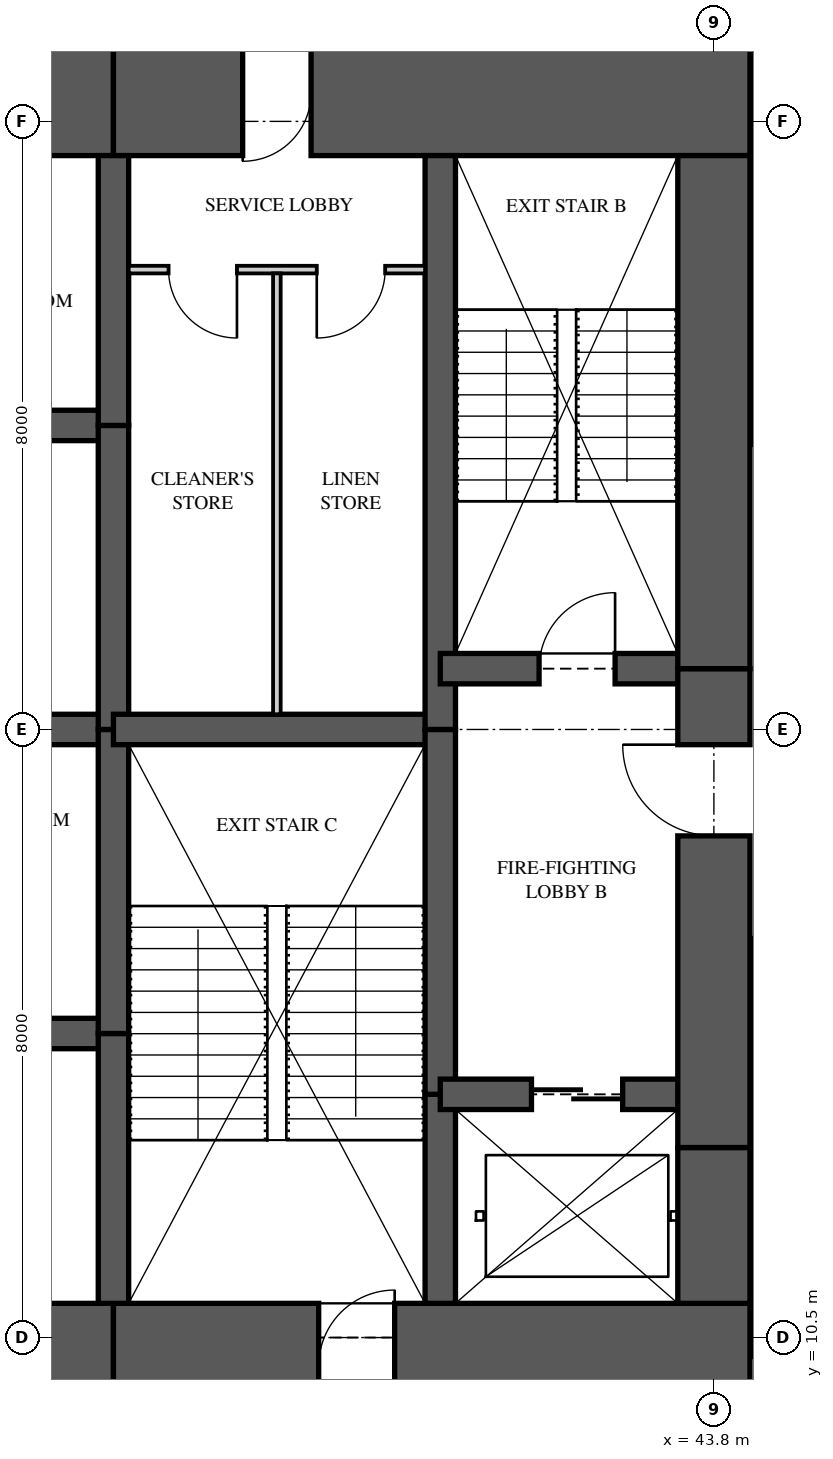
"""IFC4 building model, lengths in metres.
Left out: names, types, materials, properties, quantities, classifications, styles, units other than length and angle.
Written with IfcOpenShell. Run it as: python <this file> out.ifc"""

import sys

from ifc_helpers import new_model, si_unit, direction, frame, frame_2d, origin, place, context, subcontext, project, spatial, rectangle, extrude, element, fill, save


model = new_model("IFC4")
c1 = context("Model", 3, precision=1e-05, world=origin(), true_north=direction((0.0, 1.0)))
c2 = subcontext(c1, "Body", "Model", "MODEL_VIEW")
j1 = project(units=[si_unit("LENGTHUNIT", "METRE"), si_unit("PLANEANGLEUNIT", "RADIAN")], contexts=[c1])
p1 = place(None, origin())
s1 = spatial("IfcSite", under=j1, at=p1, CompositionType="ELEMENT")
p2 = place(p1, origin())
s2 = spatial("IfcBuilding", under=s1, at=p2, CompositionType="ELEMENT")
p3 = place(p2, frame((0.0, 0.0, 51.15)))
s3 = spatial("IfcBuildingStorey", under=s2, at=p3, CompositionType="ELEMENT", Elevation=51.15)
p4 = place(p3, frame((31.6, 10.125, 0.0), z_axis=(0.0, 0.0, 1.0), x_axis=(1.0, 0.0, 0.0)))
e1 = element("IfcWall", 1, at=p4, inside=s3, PredefinedType="SHEAR", context=c2, shape_type="SweptSolid", body=[
    extrude(rectangle(XDim=4.3, YDim=1.65, at=frame_2d((2.15, 0.0))), origin(), (0.0, 0.0, 1.0), 3.35),
])
p5 = place(p3, frame((35.9, 10.125, 0.0), z_axis=(0.0, 0.0, 1.0), x_axis=(1.0, 0.0, 0.0)))
e2 = element("IfcWall", 2, at=p5, inside=s3, PredefinedType="SHEAR", context=c2, shape_type="SweptSolid", body=[
    extrude(rectangle(XDim=8.375, YDim=1.65, at=frame_2d((4.188, 0.0))), origin(), (0.0, 0.0, 1.0), 3.35),
])
p6 = place(p5, frame((2.7, 0.0, 0.0)))
e3 = element("IfcOpeningElement", 3, at=p6, cuts=e2, PredefinedType="OPENING", context=c2, shape_type="SweptSolid", body=[
    extrude(rectangle(XDim=1.0, YDim=2.1, at=frame_2d((0.5, 1.05))), frame((0.0, 0.835, 0.0), z_axis=(0.0, -1.0, 0.0), x_axis=(1.0, 0.0, 0.0)), (0.0, 0.0, 1.0), 1.67),
])
p7 = place(p3, frame((44.275, 26.875, 0.0), z_axis=(0.0, 0.0, 1.0), x_axis=(-1.0, 0.0, 0.0)))
e4 = element("IfcWall", 4, at=p7, inside=s3, PredefinedType="SHEAR", context=c2, shape_type="SweptSolid", body=[
    extrude(rectangle(XDim=8.375, YDim=1.65, at=frame_2d((4.188, 0.0))), origin(), (0.0, 0.0, 1.0), 3.35),
])
p8 = place(p7, frame((5.775, 0.0, 0.0)))
e5 = element("IfcOpeningElement", 5, at=p8, cuts=e4, PredefinedType="OPENING", context=c2, shape_type="SweptSolid", body=[
    extrude(rectangle(XDim=0.9, YDim=2.1, at=frame_2d((0.45, 1.05))), frame((0.0, 0.835, 0.0), z_axis=(0.0, -1.0, 0.0), x_axis=(1.0, 0.0, 0.0)), (0.0, 0.0, 1.0), 1.67),
])
p9 = place(p3, frame((35.9, 26.875, 0.0), z_axis=(0.0, 0.0, 1.0), x_axis=(-1.0, 0.0, 0.0)))
e6 = element("IfcWall", 6, at=p9, inside=s3, PredefinedType="SHEAR", context=c2, shape_type="SweptSolid", body=[
    extrude(rectangle(XDim=4.3, YDim=1.65, at=frame_2d((2.15, 0.0))), origin(), (0.0, 0.0, 1.0), 3.35),
])
p10 = place(p3, frame((43.8, 10.95, 0.0), z_axis=(0.0, 0.0, 1.0), x_axis=(0.0, 1.0, 0.0)))
e7 = element("IfcWall", 7, at=p10, inside=s3, PredefinedType="SHEAR", context=c2, shape_type="SweptSolid", body=[
    extrude(rectangle(XDim=2.05, YDim=0.95, at=frame_2d((1.025, 0.0))), origin(), (0.0, 0.0, 1.0), 3.35),
])
p11 = place(p3, frame((43.8, 13.0, 0.0), z_axis=(0.0, 0.0, 1.0), x_axis=(0.0, 1.0, 0.0)))
e8 = element("IfcWall", 8, at=p11, inside=s3, PredefinedType="SHEAR", context=c2, shape_type="SweptSolid", body=[
    extrude(rectangle(XDim=6.3, YDim=0.95, at=frame_2d((3.15, 0.0))), origin(), (0.0, 0.0, 1.0), 3.35),
])
p12 = place(p11, frame((4.1, 0.0, 0.0)))
e9 = element("IfcOpeningElement", 9, at=p12, cuts=e8, PredefinedType="OPENING", context=c2, shape_type="SweptSolid", body=[
    extrude(rectangle(XDim=1.2, YDim=2.2, at=frame_2d((0.6, 1.1))), frame((0.0, 0.485, 0.0), z_axis=(0.0, -1.0, 0.0), x_axis=(1.0, 0.0, 0.0)), (0.0, 0.0, 1.0), 0.97),
])
p13 = place(p3, frame((43.8, 19.3, 0.0), z_axis=(0.0, 0.0, 1.0), x_axis=(0.0, 1.0, 0.0)))
e10 = element("IfcWall", 10, at=p13, inside=s3, PredefinedType="SHEAR", context=c2, shape_type="SweptSolid", body=[
    extrude(rectangle(XDim=6.75, YDim=0.95, at=frame_2d((3.375, 0.0))), origin(), (0.0, 0.0, 1.0), 3.35),
])
p14 = place(p3, frame((35.9, 10.95, 0.0), z_axis=(0.0, 0.0, 1.0), x_axis=(0.0, 1.0, 0.0)))
e11 = element("IfcWall", 11, at=p14, inside=s3, PredefinedType="SHEAR", context=c2, shape_type="SweptSolid", body=[
    extrude(rectangle(XDim=3.55, YDim=0.4, at=frame_2d((1.775, 0.0))), origin(), (0.0, 0.0, 1.0), 3.35),
])
for number, where, z_axis, x_axis in (
    (12, (35.9, 14.5, 0.0), (0.0, 0.0, 1.0), (0.0, 1.0, 0.0)),
    (13, (35.9, 18.5, 0.0), (0.0, 0.0, 1.0), (0.0, 1.0, 0.0)),
):
    element("IfcWall", number, at=place(p3, frame(where, z_axis=z_axis, x_axis=x_axis)), inside=s3, PredefinedType="SHEAR", context=c2, shape_type="SweptSolid", body=[
        extrude(rectangle(XDim=4.0, YDim=0.4, at=frame_2d((2.0, 0.0))), origin(), (0.0, 0.0, 1.0), 3.35),
    ])
p15 = place(p3, frame((35.9, 22.5, 0.0), z_axis=(0.0, 0.0, 1.0), x_axis=(0.0, 1.0, 0.0)))
e14 = element("IfcWall", 14, at=p15, inside=s3, PredefinedType="SHEAR", context=c2, shape_type="SweptSolid", body=[
    extrude(rectangle(XDim=3.55, YDim=0.4, at=frame_2d((1.775, 0.0))), origin(), (0.0, 0.0, 1.0), 3.35),
])
p16 = place(p3, frame((40.2, 10.95, 0.0), z_axis=(0.0, 0.0, 1.0), x_axis=(0.0, 1.0, 0.0)))
e15 = element("IfcWall", 15, at=p16, inside=s3, PredefinedType="SHEAR", context=c2, shape_type="SweptSolid", body=[
    extrude(rectangle(XDim=2.75, YDim=0.4, at=frame_2d((1.375, 0.0))), origin(), (0.0, 0.0, 1.0), 3.35),
])
p17 = place(p3, frame((40.2, 13.7, 0.0), z_axis=(0.0, 0.0, 1.0), x_axis=(0.0, 1.0, 0.0)))
e16 = element("IfcWall", 16, at=p17, inside=s3, PredefinedType="SHEAR", context=c2, shape_type="SweptSolid", body=[
    extrude(rectangle(XDim=4.8, YDim=0.4, at=frame_2d((2.4, 0.0))), origin(), (0.0, 0.0, 1.0), 3.35),
])
p18 = place(p3, frame((40.2, 18.5, 0.0), z_axis=(0.0, 0.0, 1.0), x_axis=(0.0, 1.0, 0.0)))
e17 = element("IfcWall", 17, at=p18, inside=s3, PredefinedType="SHEAR", context=c2, shape_type="SweptSolid", body=[
    extrude(rectangle(XDim=7.55, YDim=0.4, at=frame_2d((3.775, 0.0))), origin(), (0.0, 0.0, 1.0), 3.35),
])
for number, where, z_axis, x_axis in (
    (18, (31.6, 14.5, 0.0), (0.0, 0.0, 1.0), (1.0, 0.0, 0.0)),
    (19, (31.6, 18.5, 0.0), (0.0, 0.0, 1.0), (1.0, 0.0, 0.0)),
    (20, (31.6, 22.5, 0.0), (0.0, 0.0, 1.0), (1.0, 0.0, 0.0)),
):
    element("IfcWall", number, at=place(p3, frame(where, z_axis=z_axis, x_axis=x_axis)), inside=s3, PredefinedType="SHEAR", context=c2, shape_type="SweptSolid", body=[
        extrude(rectangle(XDim=4.3, YDim=0.4, at=frame_2d((2.15, 0.0))), origin(), (0.0, 0.0, 1.0), 3.35),
    ])
p19 = place(p3, frame((35.9, 18.5, 0.0), z_axis=(0.0, 0.0, 1.0), x_axis=(1.0, 0.0, 0.0)))
e21 = element("IfcWall", 21, at=p19, inside=s3, PredefinedType="SHEAR", context=c2, shape_type="SweptSolid", body=[
    extrude(rectangle(XDim=4.3, YDim=0.4, at=frame_2d((2.15, 0.0))), origin(), (0.0, 0.0, 1.0), 3.35),
])
p20 = place(p3, frame((40.2, 13.7, 0.0), z_axis=(0.0, 0.0, 1.0), x_axis=(1.0, 0.0, 0.0)))
e22 = element("IfcWall", 22, at=p20, inside=s3, PredefinedType="SHEAR", context=c2, shape_type="SweptSolid", body=[
    extrude(rectangle(XDim=3.6, YDim=0.4, at=frame_2d((1.8, 0.0))), origin(), (0.0, 0.0, 1.0), 3.35),
])
p21 = place(p20, frame((1.2, 0.0, 0.0)))
e23 = element("IfcOpeningElement", 23, at=p21, cuts=e22, PredefinedType="OPENING", context=c2, shape_type="SweptSolid", body=[
    extrude(rectangle(XDim=1.2, YDim=2.1, at=frame_2d((0.6, 1.05))), frame((0.0, 0.21, 0.0), z_axis=(0.0, -1.0, 0.0), x_axis=(1.0, 0.0, 0.0)), (0.0, 0.0, 1.0), 0.42),
])
p22 = place(p3, frame((40.2, 19.3, 0.0), z_axis=(0.0, 0.0, 1.0), x_axis=(1.0, 0.0, 0.0)))
e24 = element("IfcWall", 24, at=p22, inside=s3, PredefinedType="SHEAR", context=c2, shape_type="SweptSolid", body=[
    extrude(rectangle(XDim=3.6, YDim=0.4, at=frame_2d((1.8, 0.0))), origin(), (0.0, 0.0, 1.0), 3.35),
])
p23 = place(p22, frame((1.3, 0.0, 0.0)))
e25 = element("IfcOpeningElement", 25, at=p23, cuts=e24, PredefinedType="OPENING", context=c2, shape_type="SweptSolid", body=[
    extrude(rectangle(XDim=1.0, YDim=2.1, at=frame_2d((0.5, 1.05))), frame((0.0, 0.21, 0.0), z_axis=(0.0, -1.0, 0.0), x_axis=(1.0, 0.0, 0.0)), (0.0, 0.0, 1.0), 0.42),
])
p24 = place(p3, frame((36.1, 24.55, 0.0), z_axis=(0.0, 0.0, 1.0), x_axis=(1.0, 0.0, 0.0)))
e26 = element("IfcWall", 26, at=p24, inside=s3, PredefinedType="PARTITIONING", context=c2, shape_type="SweptSolid", body=[
    extrude(rectangle(XDim=3.9, YDim=0.1, at=frame_2d((1.95, 0.0))), origin(), (0.0, 0.0, 1.0), 3.11),
])
p25 = place(p24, frame((0.525, 0.0, 0.0)))
e27 = element("IfcOpeningElement", 27, at=p25, cuts=e26, PredefinedType="OPENING", context=c2, shape_type="SweptSolid", body=[
    extrude(rectangle(XDim=0.9, YDim=2.1, at=frame_2d((0.45, 1.05))), frame((0.0, 0.06, 0.0), z_axis=(0.0, -1.0, 0.0), x_axis=(1.0, 0.0, 0.0)), (0.0, 0.0, 1.0), 0.12),
])
p26 = place(p24, frame((2.475, 0.0, 0.0)))
e28 = element("IfcOpeningElement", 28, at=p26, cuts=e26, PredefinedType="OPENING", context=c2, shape_type="SweptSolid", body=[
    extrude(rectangle(XDim=0.9, YDim=2.1, at=frame_2d((0.45, 1.05))), frame((0.0, 0.06, 0.0), z_axis=(0.0, -1.0, 0.0), x_axis=(1.0, 0.0, 0.0)), (0.0, 0.0, 1.0), 0.12),
])
p27 = place(p3, frame((38.05, 18.7, 0.0), z_axis=(0.0, 0.0, 1.0), x_axis=(0.0, 1.0, 0.0)))
e29 = element("IfcWall", 29, at=p27, inside=s3, PredefinedType="PARTITIONING", context=c2, shape_type="SweptSolid", body=[
    extrude(rectangle(XDim=5.8, YDim=0.1, at=frame_2d((2.9, 0.0))), origin(), (0.0, 0.0, 1.0), 3.11),
])
p28 = place(p25, frame((0.9, 0.0, 0.0), z_axis=(0.0, 0.0, 1.0), x_axis=(-1.0, 0.0, 0.0)))
e30 = element("IfcDoor", 30, at=p28, inside=s3, OperationType="SINGLE_SWING_LEFT", PredefinedType="DOOR", context=c2, shape_type="SweptSolid", body=[
    extrude(rectangle(XDim=0.9, YDim=2.1, at=frame_2d((0.45, 1.05))), frame((0.0, 0.025, 0.0), z_axis=(0.0, -1.0, 0.0), x_axis=(1.0, 0.0, 0.0)), (0.0, 0.0, 1.0), 0.05),
])
fill(e27, e30)
p29 = place(p26, frame((0.9, 0.0, 0.0), z_axis=(0.0, 0.0, 1.0), x_axis=(-1.0, 0.0, 0.0)))
e31 = element("IfcDoor", 31, at=p29, inside=s3, OperationType="SINGLE_SWING_RIGHT", PredefinedType="DOOR", context=c2, shape_type="SweptSolid", body=[
    extrude(rectangle(XDim=0.9, YDim=2.1, at=frame_2d((0.45, 1.05))), frame((0.0, 0.025, 0.0), z_axis=(0.0, -1.0, 0.0), x_axis=(1.0, 0.0, 0.0)), (0.0, 0.0, 1.0), 0.05),
])
fill(e28, e31)
p30 = place(p23, origin())
e32 = element("IfcDoor", 32, at=p30, inside=s3, OperationType="SINGLE_SWING_RIGHT", PredefinedType="DOOR", context=c2, shape_type="SweptSolid", body=[
    extrude(rectangle(XDim=1.0, YDim=2.1, at=frame_2d((0.5, 1.05))), frame((0.0, 0.025, 0.0), z_axis=(0.0, -1.0, 0.0), x_axis=(1.0, 0.0, 0.0)), (0.0, 0.0, 1.0), 0.05),
])
fill(e25, e32)
p31 = place(p12, origin())
e33 = element("IfcDoor", 33, at=p31, inside=s3, OperationType="SINGLE_SWING_RIGHT", PredefinedType="DOOR", context=c2, shape_type="SweptSolid", body=[
    extrude(rectangle(XDim=1.2, YDim=2.2, at=frame_2d((0.6, 1.1))), frame((0.0, 0.025, 0.0), z_axis=(0.0, -1.0, 0.0), x_axis=(1.0, 0.0, 0.0)), (0.0, 0.0, 1.0), 0.05),
])
fill(e9, e33)
p32 = place(p21, origin())
e34 = element("IfcDoor", 34, at=p32, inside=s3, OperationType="SLIDING_TO_LEFT", PredefinedType="DOOR", context=c2, shape_type="SweptSolid", body=[
    extrude(rectangle(XDim=1.2, YDim=2.1, at=frame_2d((0.6, 1.05))), frame((0.0, 0.025, 0.0), z_axis=(0.0, -1.0, 0.0), x_axis=(1.0, 0.0, 0.0)), (0.0, 0.0, 1.0), 0.05),
])
fill(e23, e34)
p33 = place(p6, origin())
e35 = element("IfcDoor", 35, at=p33, inside=s3, OperationType="SINGLE_SWING_RIGHT", PredefinedType="DOOR", context=c2, shape_type="SweptSolid", body=[
    extrude(rectangle(XDim=1.0, YDim=2.1, at=frame_2d((0.5, 1.05))), frame((0.0, 0.025, 0.0), z_axis=(0.0, -1.0, 0.0), x_axis=(1.0, 0.0, 0.0)), (0.0, 0.0, 1.0), 0.05),
])
fill(e3, e35)
p34 = place(p8, origin())
e36 = element("IfcDoor", 36, at=p34, inside=s3, OperationType="SINGLE_SWING_RIGHT", PredefinedType="DOOR", context=c2, shape_type="SweptSolid", body=[
    extrude(rectangle(XDim=0.9, YDim=2.1, at=frame_2d((0.45, 1.05))), frame((0.0, 0.47, 0.0), z_axis=(0.0, -1.0, 0.0), x_axis=(1.0, 0.0, 0.0)), (0.0, 0.0, 1.0), 0.8),
])
fill(e5, e36)
save(model, sys.argv[1])
